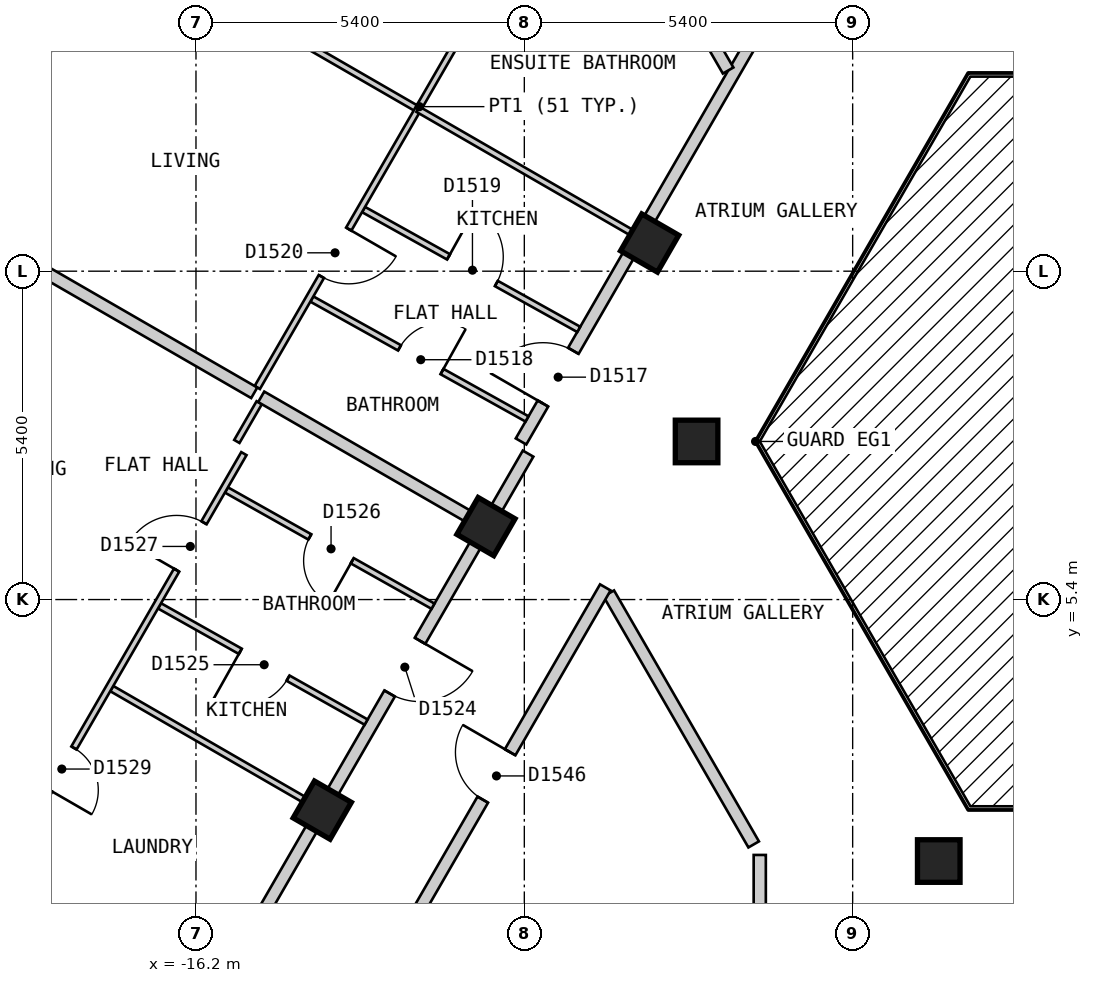
"""IFC4 building model, lengths in metres.
Left out: names, types, materials, properties, quantities, classifications, styles, units other than length and angle.
Written with IfcOpenShell. Run it as: python <this file> out.ifc"""

import sys

from ifc_helpers import new_model, si_unit, direction, frame, frame_2d, origin, origin_2d, place, context, subcontext, project, spatial, polyline, rectangle, outline, extrude, element, fill, save


model = new_model("IFC4")
c1 = context("Model", 3, precision=1e-05, world=origin(), true_north=direction((0.0, 1.0)))
c2 = subcontext(c1, "Body", "Model", "MODEL_VIEW")
j1 = project(units=[si_unit("LENGTHUNIT", "METRE"), si_unit("PLANEANGLEUNIT", "RADIAN")], contexts=[c1])
p1 = place(None, origin())
s1 = spatial("IfcSite", under=j1, at=p1, CompositionType="ELEMENT")
p2 = place(p1, origin())
s2 = spatial("IfcBuilding", under=s1, at=p2, CompositionType="ELEMENT")
p3 = place(p2, frame((0.0, 0.0, 184.2)))
s3 = spatial("IfcBuildingStorey", under=s2, at=p3, CompositionType="ELEMENT", Elevation=184.2)
for number, where, z_axis, x_axis in (
    (1, (-8.739, 11.263, 0.0), (0.0, 0.0, 1.0), (-0.5, -0.866, 0.0)),
    (2, (-7.967, 8.0, 0.0), (0.0, 0.0, 1.0), (1.0, 0.0, 0.0)),
    (3, (-11.431, 6.6, 0.0), (0.0, 0.0, 1.0), (-0.5, -0.866, 0.0)),
    (4, (-3.984, 1.1, 0.0), (0.0, 0.0, 1.0), (1.0, 0.0, 0.0)),
    (5, (-14.123, 1.937, 0.0), (0.0, 0.0, 1.0), (-0.5, -0.866, 0.0)),
):
    element("IfcColumn", number, at=place(p3, frame(where, z_axis=z_axis, x_axis=x_axis)), inside=s3, PredefinedType="COLUMN", context=c2, shape_type="SweptSolid", body=[
        extrude(rectangle(XDim=0.7, YDim=0.7, at=origin_2d()), origin(), (0.0, 0.0, 1.0), 3.0),
    ])
p4 = place(p3, frame((-14.592, 21.625, 0.0), z_axis=(0.0, 0.0, 1.0), x_axis=(-0.500010537973, -0.866019319597, 0.0)))
e6 = element("IfcWall", 6, at=p4, inside=s3, PredefinedType="SOLIDWALL", context=c2, shape_type="SweptSolid", body=[
    extrude(outline(polyline([(0.0, -0.15), (22.863, -0.15), (22.783, 0.15), (0.08, 0.15), (0.0, -0.15)])), origin(), (0.0, 0.0, 1.0), 2.7),
])
p5 = place(p4, frame((1.259, 0.0, 0.15)))
e7 = element("IfcOpeningElement", 7, at=p5, cuts=e6, PredefinedType="OPENING", context=c2, shape_type="SweptSolid", body=[
    extrude(rectangle(XDim=1.5, YDim=2.1, at=frame_2d((0.75, 1.05))), frame((0.0, 0.16, 0.0), z_axis=(0.0, -1.0, 0.0), x_axis=(1.0, 0.0, 0.0)), (0.0, 0.0, 1.0), 0.32),
])
p6 = place(p4, frame((3.952, 0.0, 0.15)))
e8 = element("IfcOpeningElement", 8, at=p6, cuts=e6, PredefinedType="OPENING", context=c2, shape_type="SweptSolid", body=[
    extrude(rectangle(XDim=1.5, YDim=2.1, at=frame_2d((0.75, 1.05))), frame((0.0, 0.16, 0.0), z_axis=(0.0, -1.0, 0.0), x_axis=(1.0, 0.0, 0.0)), (0.0, 0.0, 1.0), 0.32),
])
p7 = place(p4, frame((6.644, 0.0, 0.15)))
e9 = element("IfcOpeningElement", 9, at=p7, cuts=e6, PredefinedType="OPENING", context=c2, shape_type="SweptSolid", body=[
    extrude(rectangle(XDim=1.5, YDim=2.1, at=frame_2d((0.75, 1.05))), frame((0.0, 0.16, 0.0), z_axis=(0.0, -1.0, 0.0), x_axis=(1.0, 0.0, 0.0)), (0.0, 0.0, 1.0), 0.32),
])
p8 = place(p4, frame((9.335, 0.0, 0.15)))
e10 = element("IfcOpeningElement", 10, at=p8, cuts=e6, PredefinedType="OPENING", context=c2, shape_type="SweptSolid", body=[
    extrude(rectangle(XDim=1.5, YDim=2.1, at=frame_2d((0.75, 1.05))), frame((0.0, 0.16, 0.0), z_axis=(0.0, -1.0, 0.0), x_axis=(1.0, 0.0, 0.0)), (0.0, 0.0, 1.0), 0.32),
])
p9 = place(p4, frame((12.028, 0.0, 0.15)))
e11 = element("IfcOpeningElement", 11, at=p9, cuts=e6, PredefinedType="OPENING", context=c2, shape_type="SweptSolid", body=[
    extrude(rectangle(XDim=1.5, YDim=2.1, at=frame_2d((0.75, 1.05))), frame((0.0, 0.16, 0.0), z_axis=(0.0, -1.0, 0.0), x_axis=(1.0, 0.0, 0.0)), (0.0, 0.0, 1.0), 0.32),
])
p10 = place(p4, frame((14.72, 0.0, 0.15)))
e12 = element("IfcOpeningElement", 12, at=p10, cuts=e6, PredefinedType="OPENING", context=c2, shape_type="SweptSolid", body=[
    extrude(rectangle(XDim=1.5, YDim=2.1, at=frame_2d((0.75, 1.05))), frame((0.0, 0.16, 0.0), z_axis=(0.0, -1.0, 0.0), x_axis=(1.0, 0.0, 0.0)), (0.0, 0.0, 1.0), 0.32),
])
p11 = place(p4, frame((17.411, 0.0, 0.15)))
e13 = element("IfcOpeningElement", 13, at=p11, cuts=e6, PredefinedType="OPENING", context=c2, shape_type="SweptSolid", body=[
    extrude(rectangle(XDim=1.5, YDim=2.1, at=frame_2d((0.75, 1.05))), frame((0.0, 0.16, 0.0), z_axis=(0.0, -1.0, 0.0), x_axis=(1.0, 0.0, 0.0)), (0.0, 0.0, 1.0), 0.32),
])
p12 = place(p4, frame((20.104, 0.0, 0.15)))
e14 = element("IfcOpeningElement", 14, at=p12, cuts=e6, PredefinedType="OPENING", context=c2, shape_type="SweptSolid", body=[
    extrude(rectangle(XDim=1.5, YDim=2.1, at=frame_2d((0.75, 1.05))), frame((0.0, 0.16, 0.0), z_axis=(0.0, -1.0, 0.0), x_axis=(1.0, 0.0, 0.0)), (0.0, 0.0, 1.0), 0.32),
])
p13 = place(p3, frame((-9.411, 5.5, 0.0), z_axis=(0.0, 0.0, 1.0), x_axis=(0.500018099276, -0.86601495391, 0.0)))
e15 = element("IfcWall", 15, at=p13, inside=s3, PredefinedType="PARTITIONING", context=c2, shape_type="SweptSolid", body=[
    extrude(rectangle(XDim=4.765, YDim=0.2, at=frame_2d((2.383, 0.0))), origin(), (0.0, 0.0, 1.0), 2.7),
])
p14 = place(p3, frame((-13.048, -0.601, 0.0), z_axis=(0.0, 0.0, 1.0), x_axis=(0.499982180423, 0.866035691677, 0.0)))
e16 = element("IfcWall", 16, at=p14, inside=s3, PredefinedType="PARTITIONING", context=c2, shape_type="SweptSolid", body=[
    extrude(rectangle(XDim=7.16, YDim=0.2, at=frame_2d((3.58, 0.0))), origin(), (0.0, 0.0, 1.0), 2.7),
])
p15 = place(p14, frame((3.13, 0.0, 0.0)))
e17 = element("IfcOpeningElement", 17, at=p15, cuts=e16, PredefinedType="OPENING", context=c2, shape_type="SweptSolid", body=[
    extrude(rectangle(XDim=0.9, YDim=2.1, at=frame_2d((0.45, 1.05))), frame((0.0, 0.11, 0.0), z_axis=(0.0, -1.0, 0.0), x_axis=(1.0, 0.0, 0.0)), (0.0, 0.0, 1.0), 0.22),
])
p16 = place(p3, frame((-15.559, -0.551, 0.0), z_axis=(0.0, 0.0, 1.0), x_axis=(0.499964997208, 0.866045611713, 0.0)))
e18 = element("IfcWall", 18, at=p16, inside=s3, PredefinedType="PARTITIONING", context=c2, shape_type="SweptSolid", body=[
    extrude(rectangle(XDim=9.643, YDim=0.2, at=frame_2d((4.821, 0.0))), origin(), (0.0, 0.0, 1.0), 2.7),
])
p17 = place(p16, frame((5.088, 0.0, 0.0)))
e19 = element("IfcOpeningElement", 19, at=p17, cuts=e18, PredefinedType="OPENING", context=c2, shape_type="SweptSolid", body=[
    extrude(rectangle(XDim=1.0, YDim=2.1, at=frame_2d((0.5, 1.05))), frame((0.0, 0.11, 0.0), z_axis=(0.0, -1.0, 0.0), x_axis=(1.0, 0.0, 0.0)), (0.0, 0.0, 1.0), 0.22),
])
p18 = place(p3, frame((-10.854, 8.0, 0.0), z_axis=(0.0, 0.0, 1.0), x_axis=(0.499997637144, 0.866026767976, 0.0)))
e20 = element("IfcWall", 20, at=p18, inside=s3, PredefinedType="PARTITIONING", context=c2, shape_type="SweptSolid", body=[
    extrude(rectangle(XDim=10.854, YDim=0.2, at=frame_2d((5.427, 0.0))), origin(), (0.0, 0.0, 1.0), 2.7),
])
p19 = place(p18, frame((0.721, 0.0, 0.0)))
e21 = element("IfcOpeningElement", 21, at=p19, cuts=e20, PredefinedType="OPENING", context=c2, shape_type="SweptSolid", body=[
    extrude(rectangle(XDim=1.0, YDim=2.1, at=frame_2d((0.5, 1.05))), frame((0.0, 0.11, 0.0), z_axis=(0.0, -1.0, 0.0), x_axis=(1.0, 0.0, 0.0)), (0.0, 0.0, 1.0), 0.22),
])
p20 = place(p3, frame((-6.928, -2.8, 0.0), z_axis=(0.0, 0.0, 1.0), x_axis=(0.0, 1.0, 0.0)))
e22 = element("IfcWall", 22, at=p20, inside=s3, PredefinedType="PARTITIONING", context=c2, shape_type="SweptSolid", body=[
    extrude(rectangle(XDim=4.0, YDim=0.2, at=frame_2d((2.0, 0.0))), origin(), (0.0, 0.0, 1.0), 2.7),
])
p21 = place(p3, frame((-13.444, 11.814, 0.0), z_axis=(0.0, 0.0, 1.0), x_axis=(0.873653620945, -0.486548405207, 0.0)))
e23 = element("IfcWall", 23, at=p21, inside=s3, PredefinedType="PARTITIONING", context=c2, shape_type="SweptSolid", body=[
    extrude(rectangle(XDim=4.051, YDim=0.1, at=frame_2d((2.025, 0.0))), origin(), (0.0, 0.0, 1.0), 2.7),
])
p22 = place(p21, frame((1.6, 0.0, 0.0)))
e24 = element("IfcOpeningElement", 24, at=p22, cuts=e23, PredefinedType="OPENING", context=c2, shape_type="SweptSolid", body=[
    extrude(rectangle(XDim=0.9, YDim=2.1, at=frame_2d((0.45, 1.05))), frame((0.0, 0.06, 0.0), z_axis=(0.0, -1.0, 0.0), x_axis=(1.0, 0.0, 0.0)), (0.0, 0.0, 1.0), 0.12),
])
p23 = place(p3, frame((-14.294, 10.342, 0.0), z_axis=(0.0, 0.0, 1.0), x_axis=(0.873582256032, -0.486676527013, 0.0)))
e25 = element("IfcWall", 25, at=p23, inside=s3, PredefinedType="PARTITIONING", context=c2, shape_type="SweptSolid", body=[
    extrude(rectangle(XDim=4.05, YDim=0.1, at=frame_2d((2.025, 0.0))), origin(), (0.0, 0.0, 1.0), 2.7),
])
p24 = place(p23, frame((1.65, 0.0, 0.0)))
e26 = element("IfcOpeningElement", 26, at=p24, cuts=e25, PredefinedType="OPENING", context=c2, shape_type="SweptSolid", body=[
    extrude(rectangle(XDim=0.8, YDim=2.1, at=frame_2d((0.4, 1.05))), frame((0.0, 0.06, 0.0), z_axis=(0.0, -1.0, 0.0), x_axis=(1.0, 0.0, 0.0)), (0.0, 0.0, 1.0), 0.12),
])
p25 = place(p3, frame((-16.799, 5.296, 0.0), z_axis=(0.0, 0.0, 1.0), x_axis=(0.871565499758, -0.490279083413, 0.0)))
e27 = element("IfcWall", 27, at=p25, inside=s3, PredefinedType="PARTITIONING", context=c2, shape_type="SweptSolid", body=[
    extrude(rectangle(XDim=3.897, YDim=0.1, at=frame_2d((1.949, 0.0))), origin(), (0.0, 0.0, 1.0), 2.7),
])
p26 = place(p25, frame((1.524, 0.0, 0.0)))
e28 = element("IfcOpeningElement", 28, at=p26, cuts=e27, PredefinedType="OPENING", context=c2, shape_type="SweptSolid", body=[
    extrude(rectangle(XDim=0.9, YDim=2.1, at=frame_2d((0.45, 1.05))), frame((0.0, 0.06, 0.0), z_axis=(0.0, -1.0, 0.0), x_axis=(1.0, 0.0, 0.0)), (0.0, 0.0, 1.0), 0.12),
])
p27 = place(p3, frame((-15.699, 7.202, 0.0), z_axis=(0.0, 0.0, 1.0), x_axis=(0.871565499758, -0.490279083413, 0.0)))
e29 = element("IfcWall", 29, at=p27, inside=s3, PredefinedType="PARTITIONING", context=c2, shape_type="SweptSolid", body=[
    extrude(rectangle(XDim=3.897, YDim=0.1, at=frame_2d((1.949, 0.0))), origin(), (0.0, 0.0, 1.0), 2.7),
])
p28 = place(p27, frame((1.574, 0.0, 0.0)))
e30 = element("IfcOpeningElement", 30, at=p28, cuts=e29, PredefinedType="OPENING", context=c2, shape_type="SweptSolid", body=[
    extrude(rectangle(XDim=0.8, YDim=2.1, at=frame_2d((0.4, 1.05))), frame((0.0, 0.06, 0.0), z_axis=(0.0, -1.0, 0.0), x_axis=(1.0, 0.0, 0.0)), (0.0, 0.0, 1.0), 0.12),
])
p29 = place(p3, frame((-17.585, 3.936, 0.0), z_axis=(0.0, 0.0, 1.0), x_axis=(0.865979019114, -0.500080332001, 0.0)))
e31 = element("IfcWall", 31, at=p29, inside=s3, PredefinedType="PARTITIONING", context=c2, shape_type="SweptSolid", body=[
    extrude(rectangle(XDim=3.897, YDim=0.1, at=frame_2d((1.949, 0.0))), origin(), (0.0, 0.0, 1.0), 2.7),
])
p30 = place(p3, frame((-17.486, 16.313, 0.0), z_axis=(0.0, 0.0, 1.0), x_axis=(0.866004402611, -0.500036373335, 0.0)))
e32 = element("IfcWall", 32, at=p30, inside=s3, PredefinedType="PARTITIONING", context=c2, shape_type="SweptSolid", body=[
    extrude(rectangle(XDim=5.7, YDim=0.1, at=frame_2d((2.85, 0.0))), origin(), (0.0, 0.0, 1.0), 2.7),
])
p31 = place(p30, frame((2.4, 0.0, 0.0)))
e33 = element("IfcOpeningElement", 33, at=p31, cuts=e32, PredefinedType="OPENING", context=c2, shape_type="SweptSolid", body=[
    extrude(rectangle(XDim=0.9, YDim=2.1, at=frame_2d((0.45, 1.05))), frame((0.0, 0.06, 0.0), z_axis=(0.0, -1.0, 0.0), x_axis=(1.0, 0.0, 0.0)), (0.0, 0.0, 1.0), 0.12),
])
p32 = place(p3, frame((-19.195, 1.247, 0.0), z_axis=(0.0, 0.0, 1.0), x_axis=(0.499959862915, 0.866048575701, 0.0)))
e34 = element("IfcWall", 34, at=p32, inside=s3, PredefinedType="PARTITIONING", context=c2, shape_type="SweptSolid", body=[
    extrude(rectangle(XDim=7.566, YDim=0.1, at=frame_2d((3.783, 0.0))), origin(), (0.0, 0.0, 1.0), 2.7),
])
p33 = place(p32, frame((5.354, 0.0, 0.0)))
e35 = element("IfcOpeningElement", 35, at=p33, cuts=e34, PredefinedType="OPENING", context=c2, shape_type="SweptSolid", body=[
    extrude(rectangle(XDim=0.9, YDim=2.1, at=frame_2d((0.45, 1.05))), frame((0.0, 0.06, 0.0), z_axis=(0.0, -1.0, 0.0), x_axis=(1.0, 0.0, 0.0)), (0.0, 0.0, 1.0), 0.12),
])
p34 = place(p32, frame((1.177, 0.0, 0.0)))
e36 = element("IfcOpeningElement", 36, at=p34, cuts=e34, PredefinedType="OPENING", context=c2, shape_type="SweptSolid", body=[
    extrude(rectangle(XDim=0.8, YDim=2.1, at=frame_2d((0.4, 1.05))), frame((0.0, 0.06, 0.0), z_axis=(0.0, -1.0, 0.0), x_axis=(1.0, 0.0, 0.0)), (0.0, 0.0, 1.0), 0.12),
])
p35 = place(p3, frame((-15.528, 8.0, 0.0), z_axis=(0.0, 0.0, 1.0), x_axis=(0.500421336976, 0.865782008071, 0.0)))
e37 = element("IfcWall", 37, at=p35, inside=s3, PredefinedType="PARTITIONING", context=c2, shape_type="SweptSolid", body=[
    extrude(rectangle(XDim=0.736, YDim=0.1, at=frame_2d((0.368, 0.0))), origin(), (0.0, 0.0, 1.0), 2.7),
])
p36 = place(p3, frame((-15.192, 8.887, 0.0), z_axis=(0.0, 0.0, 1.0), x_axis=(0.500028204665, 0.866009119201, 0.0)))
e38 = element("IfcWall", 38, at=p36, inside=s3, PredefinedType="PARTITIONING", context=c2, shape_type="SweptSolid", body=[
    extrude(rectangle(XDim=10.667, YDim=0.1, at=frame_2d((5.334, 0.0))), origin(), (0.0, 0.0, 1.0), 2.7),
])
p37 = place(p36, frame((2.108, 0.0, 0.0)))
e39 = element("IfcOpeningElement", 39, at=p37, cuts=e38, PredefinedType="OPENING", context=c2, shape_type="SweptSolid", body=[
    extrude(rectangle(XDim=0.9, YDim=2.1, at=frame_2d((0.45, 1.05))), frame((0.0, 0.06, 0.0), z_axis=(0.0, -1.0, 0.0), x_axis=(1.0, 0.0, 0.0)), (0.0, 0.0, 1.0), 0.12),
])
p38 = place(p36, frame((7.576, 0.0, 0.0)))
e40 = element("IfcOpeningElement", 40, at=p38, cuts=e38, PredefinedType="OPENING", context=c2, shape_type="SweptSolid", body=[
    extrude(rectangle(XDim=0.8, YDim=2.1, at=frame_2d((0.4, 1.05))), frame((0.0, 0.06, 0.0), z_axis=(0.0, -1.0, 0.0), x_axis=(1.0, 0.0, 0.0)), (0.0, 0.0, 1.0), 0.12),
])
p39 = place(p3, frame((-9.628, 17.877, 0.0), z_axis=(0.0, 0.0, 1.0), x_axis=(0.499890461358, -0.866088636713, 0.0)))
e41 = element("IfcWall", 41, at=p39, inside=s3, PredefinedType="PARTITIONING", context=c2, shape_type="SweptSolid", body=[
    extrude(rectangle(XDim=4.361, YDim=0.2, at=frame_2d((2.18, 0.0))), origin(), (0.0, 0.0, 1.0), 2.7),
])
p40 = place(p3, frame((-20.178, 11.65, 0.0), z_axis=(0.0, 0.0, 1.0), x_axis=(0.866022950691, -0.500004248858, 0.0)))
e42 = element("IfcWall", 42, at=p40, inside=s3, PredefinedType="PARTITIONING", context=c2, shape_type="SweptSolid", body=[
    extrude(rectangle(XDim=5.7, YDim=0.2, at=frame_2d((2.85, 0.0))), origin(), (0.0, 0.0, 1.0), 2.7),
])
p41 = place(p3, frame((-15.127, 8.734, 0.0), z_axis=(0.0, 0.0, 1.0), x_axis=(0.865984601828, -0.500070664403, 0.0)))
e43 = element("IfcWall", 43, at=p41, inside=s3, PredefinedType="PARTITIONING", context=c2, shape_type="SweptSolid", body=[
    extrude(rectangle(XDim=4.167, YDim=0.2, at=frame_2d((2.084, 0.0))), origin(), (0.0, 0.0, 1.0), 2.7),
])
p42 = place(p3, frame((-12.55, 13.463, 0.0), z_axis=(0.0, 0.0, 1.0), x_axis=(0.86606561423, -0.499930346997, 0.0)))
e44 = element("IfcWall", 44, at=p42, inside=s3, PredefinedType="PARTITIONING", context=c2, shape_type="SweptSolid", body=[
    extrude(rectangle(XDim=4.1, YDim=0.1, at=frame_2d((2.05, 0.0))), origin(), (0.0, 0.0, 1.0), 2.7),
])
p43 = place(p19, origin())
e45 = element("IfcDoor", 45, at=p43, inside=s3, OperationType="SINGLE_SWING_LEFT", PredefinedType="DOOR", context=c2, shape_type="SweptSolid", body=[
    extrude(rectangle(XDim=1.0, YDim=2.1, at=frame_2d((0.5, 1.05))), frame((0.0, 0.025, 0.0), z_axis=(0.0, -1.0, 0.0), x_axis=(1.0, 0.0, 0.0)), (0.0, 0.0, 1.0), 0.05),
])
fill(e21, e45)
p44 = place(p24, origin())
e46 = element("IfcDoor", 46, at=p44, inside=s3, OperationType="SINGLE_SWING_RIGHT", PredefinedType="DOOR", context=c2, shape_type="SweptSolid", body=[
    extrude(rectangle(XDim=0.8, YDim=2.1, at=frame_2d((0.4, 1.05))), frame((0.0, 0.025, 0.0), z_axis=(0.0, -1.0, 0.0), x_axis=(1.0, 0.0, 0.0)), (0.0, 0.0, 1.0), 0.05),
])
fill(e26, e46)
p45 = place(p22, origin())
e47 = element("IfcDoor", 47, at=p45, inside=s3, OperationType="SINGLE_SWING_LEFT", PredefinedType="DOOR", context=c2, shape_type="SweptSolid", body=[
    extrude(rectangle(XDim=0.9, YDim=2.1, at=frame_2d((0.45, 1.05))), frame((0.0, 0.025, 0.0), z_axis=(0.0, -1.0, 0.0), x_axis=(1.0, 0.0, 0.0)), (0.0, 0.0, 1.0), 0.05),
])
fill(e24, e47)
p46 = place(p37, origin())
e48 = element("IfcDoor", 48, at=p46, inside=s3, OperationType="SINGLE_SWING_RIGHT", PredefinedType="DOOR", context=c2, shape_type="SweptSolid", body=[
    extrude(rectangle(XDim=0.9, YDim=2.1, at=frame_2d((0.45, 1.05))), frame((0.0, 0.025, 0.0), z_axis=(0.0, -1.0, 0.0), x_axis=(1.0, 0.0, 0.0)), (0.0, 0.0, 1.0), 0.05),
])
fill(e39, e48)
p47 = place(p17, origin())
e49 = element("IfcDoor", 49, at=p47, inside=s3, OperationType="SINGLE_SWING_RIGHT", PredefinedType="DOOR", context=c2, shape_type="SweptSolid", body=[
    extrude(rectangle(XDim=1.0, YDim=2.1, at=frame_2d((0.5, 1.05))), frame((0.0, 0.025, 0.0), z_axis=(0.0, -1.0, 0.0), x_axis=(1.0, 0.0, 0.0)), (0.0, 0.0, 1.0), 0.05),
])
fill(e19, e49)
p48 = place(p26, origin())
e50 = element("IfcDoor", 50, at=p48, inside=s3, OperationType="SINGLE_SWING_LEFT", PredefinedType="DOOR", context=c2, shape_type="SweptSolid", body=[
    extrude(rectangle(XDim=0.9, YDim=2.1, at=frame_2d((0.45, 1.05))), frame((0.0, 0.025, 0.0), z_axis=(0.0, -1.0, 0.0), x_axis=(1.0, 0.0, 0.0)), (0.0, 0.0, 1.0), 0.05),
])
fill(e28, e50)
p49 = place(p28, origin())
e51 = element("IfcDoor", 51, at=p49, inside=s3, OperationType="SINGLE_SWING_RIGHT", PredefinedType="DOOR", context=c2, shape_type="SweptSolid", body=[
    extrude(rectangle(XDim=0.8, YDim=2.1, at=frame_2d((0.4, 1.05))), frame((0.0, 0.025, 0.0), z_axis=(0.0, -1.0, 0.0), x_axis=(1.0, 0.0, 0.0)), (0.0, 0.0, 1.0), 0.05),
])
fill(e30, e51)
p50 = place(p33, origin())
e52 = element("IfcDoor", 52, at=p50, inside=s3, OperationType="SINGLE_SWING_LEFT", PredefinedType="DOOR", context=c2, shape_type="SweptSolid", body=[
    extrude(rectangle(XDim=0.9, YDim=2.1, at=frame_2d((0.45, 1.05))), frame((0.0, 0.025, 0.0), z_axis=(0.0, -1.0, 0.0), x_axis=(1.0, 0.0, 0.0)), (0.0, 0.0, 1.0), 0.05),
])
fill(e35, e52)
p51 = place(p34, origin())
e53 = element("IfcDoor", 53, at=p51, inside=s3, OperationType="SINGLE_SWING_LEFT", PredefinedType="DOOR", context=c2, shape_type="SweptSolid", body=[
    extrude(rectangle(XDim=0.8, YDim=2.1, at=frame_2d((0.4, 1.05))), frame((0.0, 0.025, 0.0), z_axis=(0.0, -1.0, 0.0), x_axis=(1.0, 0.0, 0.0)), (0.0, 0.0, 1.0), 0.05),
])
fill(e36, e53)
p52 = place(p15, origin())
e54 = element("IfcDoor", 54, at=p52, inside=s3, OperationType="SINGLE_SWING_RIGHT", PredefinedType="DOOR", context=c2, shape_type="SweptSolid", body=[
    extrude(rectangle(XDim=0.9, YDim=2.1, at=frame_2d((0.45, 1.05))), frame((0.0, 0.025, 0.0), z_axis=(0.0, -1.0, 0.0), x_axis=(1.0, 0.0, 0.0)), (0.0, 0.0, 1.0), 0.05),
])
fill(e17, e54)
save(model, sys.argv[1])
